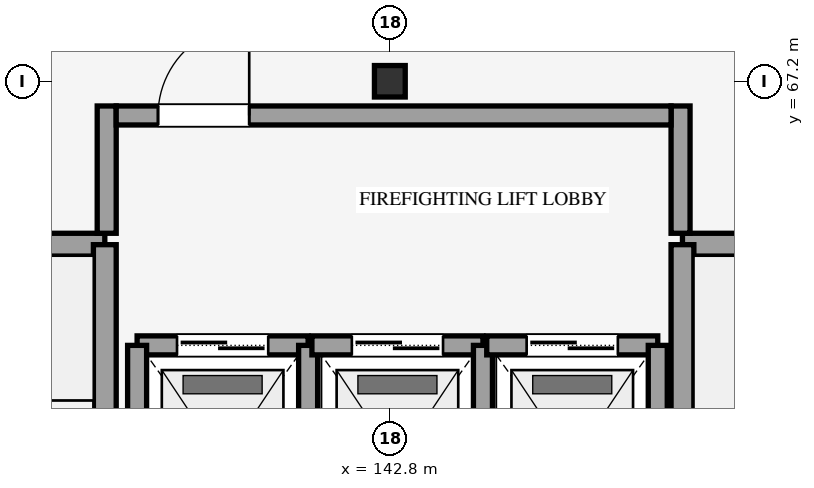
"""IFC4 building model, lengths in metres.
Left out: names, types, materials, properties, quantities, classifications, styles, units other than length and angle.
Written with IfcOpenShell. Run it as: python <this file> out.ifc"""

import sys

from ifc_helpers import new_model, si_unit, direction, frame, frame_2d, origin, origin_2d, place, context, subcontext, project, spatial, rectangle, i_section, extrude, element, fill, save


model = new_model("IFC4")
c1 = context("Model", 3, precision=1e-05, world=origin(), true_north=direction((0.0, 1.0)))
c2 = subcontext(c1, "Body", "Model", "MODEL_VIEW")
j1 = project(units=[si_unit("LENGTHUNIT", "METRE"), si_unit("PLANEANGLEUNIT", "RADIAN")], contexts=[c1])
p1 = place(None, origin())
s1 = spatial("IfcSite", under=j1, at=p1, CompositionType="ELEMENT")
p2 = place(p1, origin())
s2 = spatial("IfcBuilding", under=s1, at=p2, CompositionType="ELEMENT")
p3 = place(p2, frame((0.0, 0.0, 9.9)))
s3 = spatial("IfcBuildingStorey", under=s2, at=p3, CompositionType="ELEMENT", Elevation=9.9)
p4 = place(p3, frame((142.8, 67.2, 0.0), z_axis=(0.0, 0.0, 1.0), x_axis=(1.0, 0.0, 0.0)))
e1 = element("IfcColumn", 1, at=p4, inside=s3, PredefinedType="COLUMN", context=c2, shape_type="SweptSolid", body=[
    extrude(i_section(OverallWidth=0.405, OverallDepth=0.414, WebThickness=0.018, FlangeThickness=0.028, FilletRadius=0.022, at=origin_2d()), origin(), (0.0, 0.0, 1.0), 4.5),
])
p5 = place(p3, frame((135.05, 65.05, 0.0), z_axis=(0.0, 0.0, 1.0), x_axis=(1.0, 0.0, 0.0)))
e2 = element("IfcWall", 2, at=p5, inside=s3, PredefinedType="SHEAR", context=c2, shape_type="SweptSolid", body=[
    extrude(rectangle(XDim=4.0, YDim=0.3, at=frame_2d((2.0, 0.0))), origin(), (0.0, 0.0, 1.0), 4.5),
])
p6 = place(p3, frame((139.05, 50.75, 0.0), z_axis=(0.0, 0.0, 1.0), x_axis=(0.0, 1.0, 0.0)))
e3 = element("IfcWall", 3, at=p6, inside=s3, PredefinedType="SHEAR", context=c2, shape_type="SweptSolid", body=[
    extrude(rectangle(XDim=14.3, YDim=0.3, at=frame_2d((7.15, 0.0))), origin(), (0.0, 0.0, 1.0), 4.5),
])
p7 = place(p3, frame((146.65, 65.05, 0.0), z_axis=(0.0, 0.0, 1.0), x_axis=(1.0, 0.0, 0.0)))
e4 = element("IfcWall", 4, at=p7, inside=s3, PredefinedType="SHEAR", context=c2, shape_type="SweptSolid", body=[
    extrude(rectangle(XDim=4.0, YDim=0.3, at=frame_2d((2.0, 0.0))), origin(), (0.0, 0.0, 1.0), 4.5),
])
p8 = place(p3, frame((146.65, 50.75, 0.0), z_axis=(0.0, 0.0, 1.0), x_axis=(0.0, 1.0, 0.0)))
e5 = element("IfcWall", 5, at=p8, inside=s3, PredefinedType="SHEAR", context=c2, shape_type="SweptSolid", body=[
    extrude(rectangle(XDim=14.3, YDim=0.3, at=frame_2d((7.15, 0.0))), origin(), (0.0, 0.0, 1.0), 4.5),
])
p9 = place(p3, frame((139.475, 63.725, 0.0), z_axis=(0.0, 0.0, 1.0), x_axis=(1.0, 0.0, 0.0)))
e6 = element("IfcWall", 6, at=p9, inside=s3, PredefinedType="SHEAR", context=c2, shape_type="SweptSolid", body=[
    extrude(rectangle(XDim=2.25, YDim=0.25, at=frame_2d((1.125, 0.0))), origin(), (0.0, 0.0, 1.0), 4.24),
])
p10 = place(p9, frame((0.525, 0.0, 0.0)))
e7 = element("IfcOpeningElement", 7, at=p10, cuts=e6, PredefinedType="OPENING", context=c2, shape_type="SweptSolid", body=[
    extrude(rectangle(XDim=1.2, YDim=2.18, at=frame_2d((0.6, 1.09))), frame((0.0, 0.135, 0.0), z_axis=(0.0, -1.0, 0.0), x_axis=(1.0, 0.0, 0.0)), (0.0, 0.0, 1.0), 0.27),
])
for number, where, z_axis, x_axis in (
    (8, (139.475, 60.675, 0.0), (0.0, 0.0, 1.0), (0.0, 1.0, 0.0)),
    (9, (141.725, 60.675, 0.0), (0.0, 0.0, 1.0), (0.0, 1.0, 0.0)),
):
    element("IfcWall", number, at=place(p3, frame(where, z_axis=z_axis, x_axis=x_axis)), inside=s3, PredefinedType="SHEAR", context=c2, shape_type="SweptSolid", body=[
        extrude(rectangle(XDim=3.05, YDim=0.25, at=frame_2d((1.525, 0.0))), origin(), (0.0, 0.0, 1.0), 4.24),
    ])
p11 = place(p3, frame((141.775, 63.725, 0.0), z_axis=(0.0, 0.0, 1.0), x_axis=(1.0, 0.0, 0.0)))
e10 = element("IfcWall", 10, at=p11, inside=s3, PredefinedType="SHEAR", context=c2, shape_type="SweptSolid", body=[
    extrude(rectangle(XDim=2.25, YDim=0.25, at=frame_2d((1.125, 0.0))), origin(), (0.0, 0.0, 1.0), 4.24),
])
p12 = place(p11, frame((0.525, 0.0, 0.0)))
e11 = element("IfcOpeningElement", 11, at=p12, cuts=e10, PredefinedType="OPENING", context=c2, shape_type="SweptSolid", body=[
    extrude(rectangle(XDim=1.2, YDim=2.18, at=frame_2d((0.6, 1.09))), frame((0.0, 0.135, 0.0), z_axis=(0.0, -1.0, 0.0), x_axis=(1.0, 0.0, 0.0)), (0.0, 0.0, 1.0), 0.27),
])
p13 = place(p3, frame((144.025, 60.675, 0.0), z_axis=(0.0, 0.0, 1.0), x_axis=(0.0, 1.0, 0.0)))
e12 = element("IfcWall", 12, at=p13, inside=s3, PredefinedType="SHEAR", context=c2, shape_type="SweptSolid", body=[
    extrude(rectangle(XDim=3.05, YDim=0.25, at=frame_2d((1.525, 0.0))), origin(), (0.0, 0.0, 1.0), 4.24),
])
p14 = place(p3, frame((144.075, 63.725, 0.0), z_axis=(0.0, 0.0, 1.0), x_axis=(1.0, 0.0, 0.0)))
e13 = element("IfcWall", 13, at=p14, inside=s3, PredefinedType="SHEAR", context=c2, shape_type="SweptSolid", body=[
    extrude(rectangle(XDim=2.25, YDim=0.25, at=frame_2d((1.125, 0.0))), origin(), (0.0, 0.0, 1.0), 4.24),
])
p15 = place(p14, frame((0.525, 0.0, 0.0)))
e14 = element("IfcOpeningElement", 14, at=p15, cuts=e13, PredefinedType="OPENING", context=c2, shape_type="SweptSolid", body=[
    extrude(rectangle(XDim=1.2, YDim=2.18, at=frame_2d((0.6, 1.09))), frame((0.0, 0.135, 0.0), z_axis=(0.0, -1.0, 0.0), x_axis=(1.0, 0.0, 0.0)), (0.0, 0.0, 1.0), 0.27),
])
p16 = place(p3, frame((146.325, 60.675, 0.0), z_axis=(0.0, 0.0, 1.0), x_axis=(0.0, 1.0, 0.0)))
e15 = element("IfcWall", 15, at=p16, inside=s3, PredefinedType="SHEAR", context=c2, shape_type="SweptSolid", body=[
    extrude(rectangle(XDim=3.05, YDim=0.25, at=frame_2d((1.525, 0.0))), origin(), (0.0, 0.0, 1.0), 4.24),
])
for number, where, z_axis, x_axis in (
    (16, (139.075, 65.2, 0.0), (0.0, 0.0, 1.0), (0.0, 1.0, 0.0)),
    (17, (146.625, 65.2, 0.0), (0.0, 0.0, 1.0), (0.0, 1.0, 0.0)),
):
    element("IfcWall", number, at=place(p3, frame(where, z_axis=z_axis, x_axis=x_axis)), inside=s3, PredefinedType="SHEAR", context=c2, shape_type="SweptSolid", body=[
        extrude(rectangle(XDim=1.675, YDim=0.25, at=frame_2d((0.837, 0.0))), origin(), (0.0, 0.0, 1.0), 4.24),
    ])
p17 = place(p3, frame((139.2, 66.75, 0.0), z_axis=(0.0, 0.0, 1.0), x_axis=(1.0, 0.0, 0.0)))
e18 = element("IfcWall", 18, at=p17, inside=s3, PredefinedType="SHEAR", context=c2, shape_type="SweptSolid", body=[
    extrude(rectangle(XDim=7.3, YDim=0.25, at=frame_2d((3.65, 0.0))), origin(), (0.0, 0.0, 1.0), 4.24),
])
p18 = place(p17, frame((0.55, 0.0, 0.0)))
e19 = element("IfcOpeningElement", 19, at=p18, cuts=e18, PredefinedType="OPENING", context=c2, shape_type="SweptSolid", body=[
    extrude(rectangle(XDim=1.2, YDim=2.15, at=frame_2d((0.6, 1.075))), frame((0.0, 0.135, 0.0), z_axis=(0.0, -1.0, 0.0), x_axis=(1.0, 0.0, 0.0)), (0.0, 0.0, 1.0), 0.27),
])
p19 = place(p10, origin())
e20 = element("IfcDoor", 20, at=p19, inside=s3, OperationType="DOUBLE_DOOR_SLIDING", PredefinedType="DOOR", context=c2, shape_type="SweptSolid", body=[
    extrude(rectangle(XDim=1.2, YDim=2.18, at=frame_2d((0.6, 1.09))), frame((0.0, 0.025, 0.0), z_axis=(0.0, -1.0, 0.0), x_axis=(1.0, 0.0, 0.0)), (0.0, 0.0, 1.0), 0.05),
])
fill(e7, e20)
p20 = place(p12, origin())
e21 = element("IfcDoor", 21, at=p20, inside=s3, OperationType="DOUBLE_DOOR_SLIDING", PredefinedType="DOOR", context=c2, shape_type="SweptSolid", body=[
    extrude(rectangle(XDim=1.2, YDim=2.18, at=frame_2d((0.6, 1.09))), frame((0.0, 0.025, 0.0), z_axis=(0.0, -1.0, 0.0), x_axis=(1.0, 0.0, 0.0)), (0.0, 0.0, 1.0), 0.05),
])
fill(e11, e21)
p21 = place(p15, origin())
e22 = element("IfcDoor", 22, at=p21, inside=s3, OperationType="DOUBLE_DOOR_SLIDING", PredefinedType="DOOR", context=c2, shape_type="SweptSolid", body=[
    extrude(rectangle(XDim=1.2, YDim=2.18, at=frame_2d((0.6, 1.09))), frame((0.0, 0.025, 0.0), z_axis=(0.0, -1.0, 0.0), x_axis=(1.0, 0.0, 0.0)), (0.0, 0.0, 1.0), 0.05),
])
fill(e14, e22)
p22 = place(p18, origin())
e23 = element("IfcDoor", 23, at=p22, inside=s3, OperationType="SINGLE_SWING_RIGHT", PredefinedType="DOOR", context=c2, shape_type="SweptSolid", body=[
    extrude(rectangle(XDim=1.2, YDim=2.15, at=frame_2d((0.6, 1.075))), frame((0.0, 0.025, 0.0), z_axis=(0.0, -1.0, 0.0), x_axis=(1.0, 0.0, 0.0)), (0.0, 0.0, 1.0), 0.05),
])
fill(e19, e23)
save(model, sys.argv[1])
